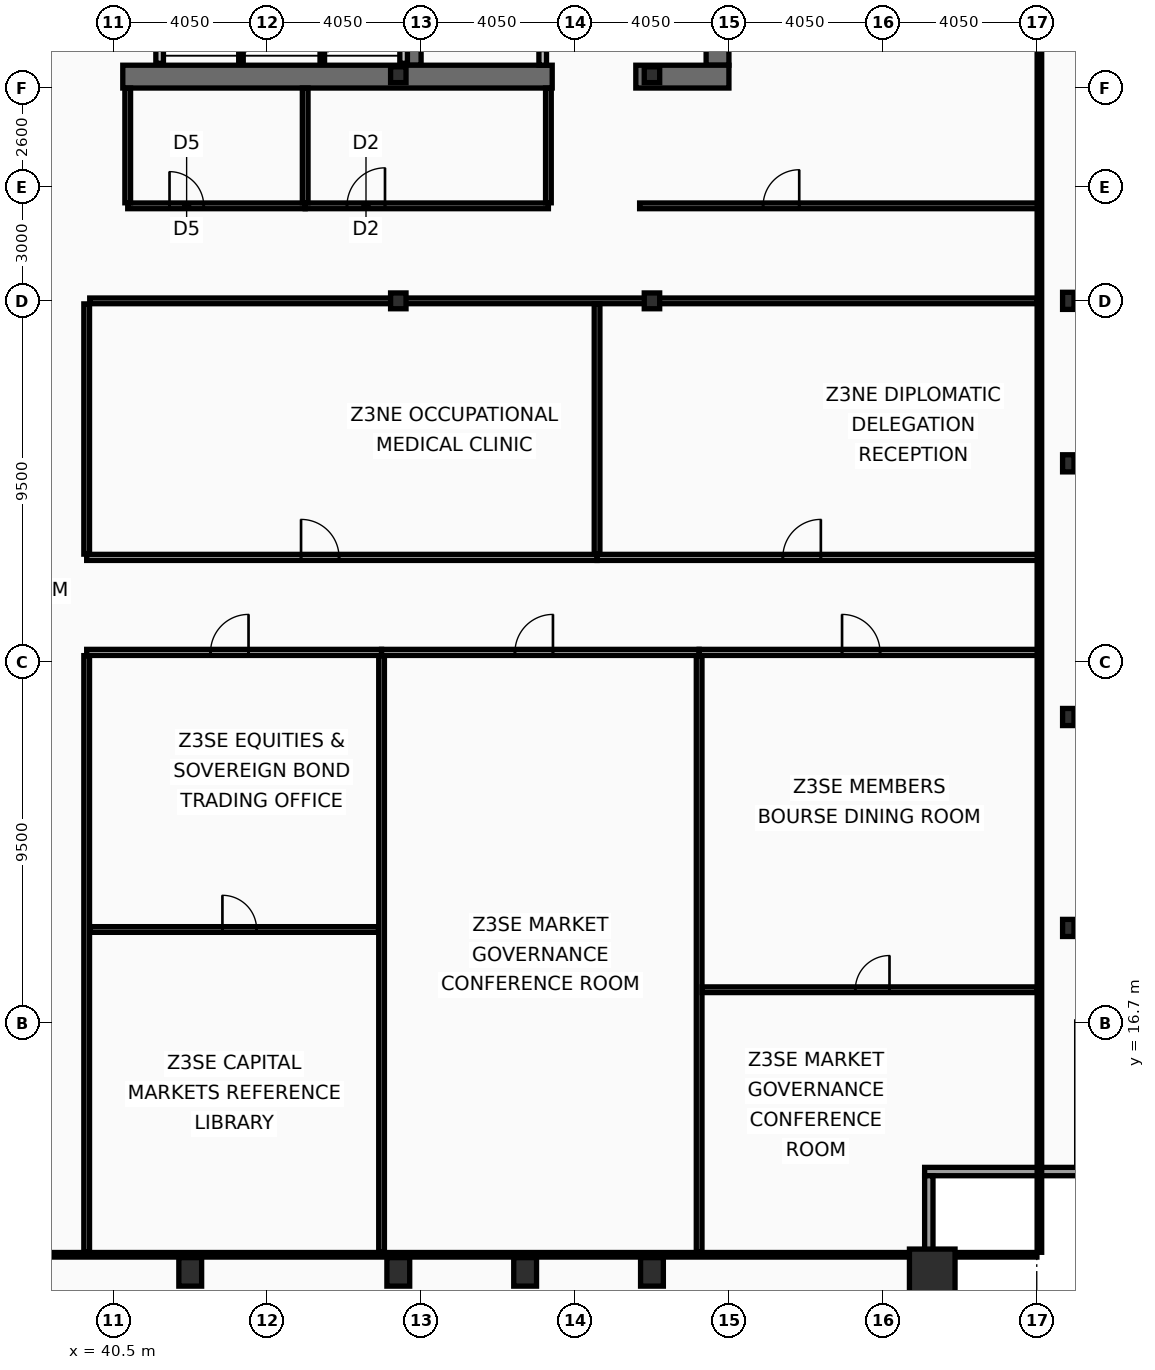
"""IFC4 building model, lengths in metres.
Left out: names, types, materials, properties, quantities, classifications, styles, units other than length and angle.
Written with IfcOpenShell. Run it as: python <this file> out.ifc"""

import sys

from ifc_helpers import new_model, si_unit, direction, frame, frame_2d, origin, origin_2d, place, context, subcontext, project, spatial, rectangle, hollow_rectangle, i_section, extrude, element, fill, save


model = new_model("IFC4")
c1 = context("Model", 3, precision=1e-05, world=origin(), true_north=direction((0.0, 1.0)))
c2 = subcontext(c1, "Body", "Model", "MODEL_VIEW")
j1 = project(units=[si_unit("LENGTHUNIT", "METRE"), si_unit("PLANEANGLEUNIT", "RADIAN")], contexts=[c1])
p1 = place(None, origin())
s1 = spatial("IfcSite", under=j1, at=p1, CompositionType="ELEMENT")
p2 = place(p1, origin())
s2 = spatial("IfcBuilding", under=s1, at=p2, CompositionType="ELEMENT")
p3 = place(p2, frame((0.0, 0.0, 203.0)))
s3 = spatial("IfcBuildingStorey", under=s2, at=p3, CompositionType="ELEMENT", Elevation=203.0)
p4 = place(p3, frame((56.4, 53.1, 0.0), z_axis=(0.0, 0.0, 1.0), x_axis=(0.0, -1.0, 0.0)))
e1 = element("IfcWall", 1, at=p4, inside=s3, PredefinedType="SHEAR", context=c2, shape_type="SweptSolid", body=[
    extrude(rectangle(XDim=11.2, YDim=0.6, at=frame_2d((5.6, 0.0))), origin(), (0.0, 0.0, 1.0), 3.44),
])
p5 = place(p3, frame((48.4, 41.9, 0.0), z_axis=(0.0, 0.0, 1.0), x_axis=(0.0, 1.0, 0.0)))
e2 = element("IfcWall", 2, at=p5, inside=s3, PredefinedType="SHEAR", context=c2, shape_type="SweptSolid", body=[
    extrude(rectangle(XDim=11.2, YDim=0.4, at=frame_2d((5.6, 0.0))), origin(), (0.0, 0.0, 1.0), 3.44),
])
p6 = place(p3, frame((52.05, 41.6, 0.0), z_axis=(0.0, 0.0, 1.0), x_axis=(-1.0, 0.0, 0.0)))
e3 = element("IfcWall", 3, at=p6, inside=s3, PredefinedType="SHEAR", context=c2, shape_type="SweptSolid", body=[
    extrude(rectangle(XDim=11.3, YDim=0.6, at=frame_2d((5.65, 0.0))), origin(), (0.0, 0.0, 1.0), 3.44),
])
p7 = place(p3, frame((56.7, 41.6, 0.0), z_axis=(0.0, 0.0, 1.0), x_axis=(-1.0, 0.0, 0.0)))
e4 = element("IfcWall", 4, at=p7, inside=s3, PredefinedType="SHEAR", context=c2, shape_type="SweptSolid", body=[
    extrude(rectangle(XDim=2.45, YDim=0.6, at=frame_2d((1.225, 0.0))), origin(), (0.0, 0.0, 1.0), 3.44),
])
p8 = place(p3, frame((62.05, 10.15, 0.0), z_axis=(0.0, 0.0, 1.0), x_axis=(1.0, 0.0, 0.0)))
e5 = element("IfcColumn", 5, at=p8, inside=s3, PredefinedType="COLUMN", context=c2, shape_type="SweptSolid", body=[
    extrude(hollow_rectangle(XDim=1.2, YDim=1.2, WallThickness=0.06, at=origin_2d()), origin(), (0.0, 0.0, 1.0), 3.6),
])
for number, where, z_axis, x_axis in (
    (6, (42.525, 10.15, 0.0), (0.0, 0.0, 1.0), (1.0, 0.0, 0.0)),
    (7, (48.0, 10.15, 0.0), (0.0, 0.0, 1.0), (1.0, 0.0, 0.0)),
    (8, (51.337, 10.15, 0.0), (0.0, 0.0, 1.0), (1.0, 0.0, 0.0)),
    (9, (54.675, 10.15, 0.0), (0.0, 0.0, 1.0), (1.0, 0.0, 0.0)),
):
    element("IfcColumn", number, at=place(p3, frame(where, z_axis=z_axis, x_axis=x_axis)), inside=s3, PredefinedType="COLUMN", context=c2, shape_type="SweptSolid", body=[
        extrude(hollow_rectangle(XDim=0.6, YDim=0.75, WallThickness=0.045, at=origin_2d()), origin(), (0.0, 0.0, 1.0), 3.6),
    ])
for number, where, z_axis, x_axis in (
    (10, (65.63, 19.2, 0.0), (0.0, 0.0, 1.0), (1.0, 0.0, 0.0)),
    (11, (65.63, 24.75, 0.0), (0.0, 0.0, 1.0), (1.0, 0.0, 0.0)),
    (12, (65.63, 31.425, 0.0), (0.0, 0.0, 1.0), (1.0, 0.0, 0.0)),
    (13, (65.63, 35.7, 0.0), (0.0, 0.0, 1.0), (1.0, 0.0, 0.0)),
):
    element("IfcColumn", number, at=place(p3, frame(where, z_axis=z_axis, x_axis=x_axis)), inside=s3, PredefinedType="COLUMN", context=c2, shape_type="SweptSolid", body=[
        extrude(i_section(OverallWidth=0.3, OverallDepth=0.45, WebThickness=0.014, FlangeThickness=0.026, at=origin_2d()), origin(), (0.0, 0.0, 1.0), 3.6),
    ])
for number, where, z_axis, x_axis in (
    (14, (48.0, 35.7, 0.0), (0.0, 0.0, 1.0), (1.0, 0.0, 0.0)),
    (15, (48.0, 41.65, 0.0), (0.0, 0.0, 1.0), (1.0, 0.0, 0.0)),
    (16, (54.675, 35.7, 0.0), (0.0, 0.0, 1.0), (1.0, 0.0, 0.0)),
    (17, (54.675, 41.65, 0.0), (0.0, 0.0, 1.0), (1.0, 0.0, 0.0)),
):
    element("IfcColumn", number, at=place(p3, frame(where, z_axis=z_axis, x_axis=x_axis)), inside=s3, PredefinedType="COLUMN", context=c2, shape_type="SweptSolid", body=[
        extrude(i_section(OverallWidth=0.406, OverallDepth=0.416, WebThickness=0.03, FlangeThickness=0.048, at=origin_2d()), origin(), (0.0, 0.0, 1.0), 3.6),
    ])
p9 = place(p3, frame((66.07, 12.79, 0.0), z_axis=(0.0, 0.0, 1.0), x_axis=(-1.0, 0.0, 0.0)))
e18 = element("IfcWall", 18, at=p9, inside=s3, PredefinedType="SOLIDWALL", context=c2, shape_type="SweptSolid", body=[
    extrude(rectangle(XDim=4.22, YDim=0.22, at=frame_2d((2.11, 0.0))), origin(), (0.0, 0.0, 1.0), 2.83),
])
p10 = place(p3, frame((61.96, 12.68, 0.0), z_axis=(0.0, 0.0, 1.0), x_axis=(0.0, -1.0, 0.0)))
e19 = element("IfcWall", 19, at=p10, inside=s3, PredefinedType="SOLIDWALL", context=c2, shape_type="SweptSolid", body=[
    extrude(rectangle(XDim=3.91, YDim=0.22, at=frame_2d((1.955, 0.0))), origin(), (0.0, 0.0, 1.0), 2.83),
])
p11 = place(p3, frame((51.8, 41.9, 0.0), z_axis=(0.0, 0.0, 1.0), x_axis=(0.0, 1.0, 0.0)))
e20 = element("IfcWall", 20, at=p11, inside=s3, PredefinedType="PARTITIONING", context=c2, shape_type="SweptSolid", body=[
    extrude(rectangle(XDim=2.595, YDim=0.2, at=frame_2d((1.298, 0.0))), origin(), (0.0, 0.0, 1.0), 3.44),
])
p12 = place(p11, frame((0.38, 0.0, 0.0)))
e21 = element("IfcOpeningElement", 21, at=p12, cuts=e20, PredefinedType="OPENING", context=c2, shape_type="SweptSolid", body=[
    extrude(rectangle(XDim=1.05, YDim=2.15, at=frame_2d((0.525, 1.075))), frame((0.0, 0.11, 0.0), z_axis=(0.0, -1.0, 0.0), x_axis=(1.0, 0.0, 0.0)), (0.0, 0.0, 1.0), 0.22),
])
for number, where, z_axis, x_axis in (
    (22, (41.72, 41.95, 0.0), (0.0, 0.0, 1.0), (0.0, 1.0, 0.0)),
    (23, (48.14, 41.95, 0.0), (0.0, 0.0, 1.0), (0.0, 1.0, 0.0)),
):
    element("IfcWall", number, at=place(p3, frame(where, z_axis=z_axis, x_axis=x_axis)), inside=s3, PredefinedType="PARTITIONING", context=c2, shape_type="SweptSolid", body=[
        extrude(rectangle(XDim=2.295, YDim=0.2, at=frame_2d((1.147, 0.0))), origin(), (0.0, 0.0, 1.0), 3.44),
    ])
for number, where, z_axis, x_axis in (
    (24, (43.86, 41.95, 0.0), (0.0, 0.0, 1.0), (0.0, 1.0, 0.0)),
    (25, (46.0, 41.95, 0.0), (0.0, 0.0, 1.0), (0.0, 1.0, 0.0)),
):
    element("IfcWall", number, at=place(p3, frame(where, z_axis=z_axis, x_axis=x_axis)), inside=s3, PredefinedType="PARTITIONING", context=c2, shape_type="SweptSolid", body=[
        extrude(rectangle(XDim=2.295, YDim=0.12, at=frame_2d((1.147, 0.0))), origin(), (0.0, 0.0, 1.0), 3.44),
    ])
p13 = place(p3, frame((40.88, 38.2, 0.0), z_axis=(0.0, 0.0, 1.0), x_axis=(1.0, 0.0, 0.0)))
e26 = element("IfcWall", 26, at=p13, inside=s3, PredefinedType="PARTITIONING", context=c2, shape_type="SweptSolid", body=[
    extrude(rectangle(XDim=4.67, YDim=0.15, at=frame_2d((2.335, 0.0))), origin(), (0.0, 0.0, 1.0), 2.73),
])
p14 = place(p13, frame((1.1, 0.0, 0.0)))
e27 = element("IfcOpeningElement", 27, at=p14, cuts=e26, PredefinedType="OPENING", context=c2, shape_type="SweptSolid", body=[
    extrude(rectangle(XDim=0.9, YDim=2.05, at=frame_2d((0.45, 1.025))), frame((0.0, 0.085, 0.0), z_axis=(0.0, -1.0, 0.0), x_axis=(1.0, 0.0, 0.0)), (0.0, 0.0, 1.0), 0.17),
])
p15 = place(p3, frame((45.55, 38.2, 0.0), z_axis=(0.0, 0.0, 1.0), x_axis=(1.0, 0.0, 0.0)))
e28 = element("IfcWall", 28, at=p15, inside=s3, PredefinedType="PARTITIONING", context=c2, shape_type="SweptSolid", body=[
    extrude(rectangle(XDim=6.4, YDim=0.15, at=frame_2d((3.2, 0.0))), origin(), (0.0, 0.0, 1.0), 2.73),
])
p16 = place(p15, frame((1.1, 0.0, 0.0)))
e29 = element("IfcOpeningElement", 29, at=p16, cuts=e28, PredefinedType="OPENING", context=c2, shape_type="SweptSolid", body=[
    extrude(rectangle(XDim=1.0, YDim=2.05, at=frame_2d((0.5, 1.025))), frame((0.0, 0.085, 0.0), z_axis=(0.0, -1.0, 0.0), x_axis=(1.0, 0.0, 0.0)), (0.0, 0.0, 1.0), 0.17),
])
for number, where, z_axis, x_axis in (
    (30, (40.88, 38.28, 0.0), (0.0, 0.0, 1.0), (0.0, 1.0, 0.0)),
    (31, (45.55, 38.28, 0.0), (0.0, 0.0, 1.0), (0.0, 1.0, 0.0)),
    (32, (51.95, 38.28, 0.0), (0.0, 0.0, 1.0), (0.0, 1.0, 0.0)),
):
    element("IfcWall", number, at=place(p3, frame(where, z_axis=z_axis, x_axis=x_axis)), inside=s3, PredefinedType="PARTITIONING", context=c2, shape_type="SweptSolid", body=[
        extrude(rectangle(XDim=3.02, YDim=0.15, at=frame_2d((1.51, 0.0))), origin(), (0.0, 0.0, 1.0), 3.44),
    ])
p17 = place(p3, frame((54.35, 38.2, 0.0), z_axis=(0.0, 0.0, 1.0), x_axis=(1.0, 0.0, 0.0)))
e33 = element("IfcWall", 33, at=p17, inside=s3, PredefinedType="PARTITIONING", context=c2, shape_type="SweptSolid", body=[
    extrude(rectangle(XDim=10.52, YDim=0.15, at=frame_2d((5.26, 0.0))), origin(), (0.0, 0.0, 1.0), 2.73),
])
p18 = place(p17, frame((3.25, 0.0, 0.0)))
e34 = element("IfcOpeningElement", 34, at=p18, cuts=e33, PredefinedType="OPENING", context=c2, shape_type="SweptSolid", body=[
    extrude(rectangle(XDim=0.95, YDim=2.05, at=frame_2d((0.475, 1.025))), frame((0.0, 0.085, 0.0), z_axis=(0.0, -1.0, 0.0), x_axis=(1.0, 0.0, 0.0)), (0.0, 0.0, 1.0), 0.17),
])
p19 = place(p3, frame((39.8, 10.665, 0.0), z_axis=(0.0, 0.0, 1.0), x_axis=(0.0, 1.0, 0.0)))
e35 = element("IfcWall", 35, at=p19, inside=s3, PredefinedType="PARTITIONING", context=c2, shape_type="SweptSolid", body=[
    extrude(rectangle(XDim=15.7, YDim=0.15, at=frame_2d((7.85, 0.0))), origin(), (0.0, 0.0, 1.0), 2.98),
])
p20 = place(p3, frame((39.8, 29.035, 0.0), z_axis=(0.0, 0.0, 1.0), x_axis=(0.0, 1.0, 0.0)))
e36 = element("IfcWall", 36, at=p20, inside=s3, PredefinedType="PARTITIONING", context=c2, shape_type="SweptSolid", body=[
    extrude(rectangle(XDim=6.585, YDim=0.15, at=frame_2d((3.292, 0.0))), origin(), (0.0, 0.0, 1.0), 2.98),
])
p21 = place(p3, frame((39.88, 35.7, 0.0), z_axis=(0.0, 0.0, 1.0), x_axis=(1.0, 0.0, 0.0)))
e37 = element("IfcWall", 37, at=p21, inside=s3, PredefinedType="PARTITIONING", context=c2, shape_type="SweptSolid", body=[
    extrude(rectangle(XDim=24.925, YDim=0.15, at=frame_2d((12.462, 0.0))), origin(), (0.0, 0.0, 1.0), 2.73),
])
p22 = place(p3, frame((39.8, 26.45, 0.0), z_axis=(0.0, 0.0, 1.0), x_axis=(1.0, 0.0, 0.0)))
e38 = element("IfcWall", 38, at=p22, inside=s3, PredefinedType="PARTITIONING", context=c2, shape_type="SweptSolid", body=[
    extrude(rectangle(XDim=7.76, YDim=0.16, at=frame_2d((3.88, 0.0))), origin(), (0.0, 0.0, 1.0), 2.73),
])
p23 = place(p22, frame((3.259, 0.0, 0.0)))
e39 = element("IfcOpeningElement", 39, at=p23, cuts=e38, PredefinedType="OPENING", context=c2, shape_type="SweptSolid", body=[
    extrude(rectangle(XDim=1.0, YDim=2.05, at=frame_2d((0.5, 1.025))), frame((0.0, 0.09, 0.0), z_axis=(0.0, -1.0, 0.0), x_axis=(1.0, 0.0, 0.0)), (0.0, 0.0, 1.0), 0.18),
])
p24 = place(p3, frame((39.88, 19.159, 0.0), z_axis=(0.0, 0.0, 1.0), x_axis=(1.0, 0.0, 0.0)))
e40 = element("IfcWall", 40, at=p24, inside=s3, PredefinedType="PARTITIONING", context=c2, shape_type="SweptSolid", body=[
    extrude(rectangle(XDim=7.6, YDim=0.15, at=frame_2d((3.8, 0.0))), origin(), (0.0, 0.0, 1.0), 2.73),
])
p25 = place(p24, frame((3.492, 0.0, 0.0)))
e41 = element("IfcOpeningElement", 41, at=p25, cuts=e40, PredefinedType="OPENING", context=c2, shape_type="SweptSolid", body=[
    extrude(rectangle(XDim=0.9, YDim=2.05, at=frame_2d((0.45, 1.025))), frame((0.0, 0.085, 0.0), z_axis=(0.0, -1.0, 0.0), x_axis=(1.0, 0.0, 0.0)), (0.0, 0.0, 1.0), 0.17),
])
p26 = place(p3, frame((47.56, 26.45, 0.0), z_axis=(0.0, 0.0, 1.0), x_axis=(1.0, 0.0, 0.0)))
e42 = element("IfcWall", 42, at=p26, inside=s3, PredefinedType="PARTITIONING", context=c2, shape_type="SweptSolid", body=[
    extrude(rectangle(XDim=8.357, YDim=0.16, at=frame_2d((4.178, 0.0))), origin(), (0.0, 0.0, 1.0), 2.73),
])
p27 = place(p26, frame((3.51, 0.0, 0.0)))
e43 = element("IfcOpeningElement", 43, at=p27, cuts=e42, PredefinedType="OPENING", context=c2, shape_type="SweptSolid", body=[
    extrude(rectangle(XDim=1.0, YDim=2.05, at=frame_2d((0.5, 1.025))), frame((0.0, 0.09, 0.0), z_axis=(0.0, -1.0, 0.0), x_axis=(1.0, 0.0, 0.0)), (0.0, 0.0, 1.0), 0.18),
])
p28 = place(p3, frame((47.56, 10.665, 0.0), z_axis=(0.0, 0.0, 1.0), x_axis=(0.0, 1.0, 0.0)))
e44 = element("IfcWall", 44, at=p28, inside=s3, PredefinedType="PARTITIONING", context=c2, shape_type="SweptSolid", body=[
    extrude(rectangle(XDim=15.7, YDim=0.15, at=frame_2d((7.85, 0.0))), origin(), (0.0, 0.0, 1.0), 2.73),
])
p29 = place(p3, frame((55.917, 26.45, 0.0), z_axis=(0.0, 0.0, 1.0), x_axis=(1.0, 0.0, 0.0)))
e45 = element("IfcWall", 45, at=p29, inside=s3, PredefinedType="PARTITIONING", context=c2, shape_type="SweptSolid", body=[
    extrude(rectangle(XDim=8.954, YDim=0.16, at=frame_2d((4.477, 0.0))), origin(), (0.0, 0.0, 1.0), 3.44),
])
p30 = place(p29, frame((3.76, 0.0, 0.0)))
e46 = element("IfcOpeningElement", 46, at=p30, cuts=e45, PredefinedType="OPENING", context=c2, shape_type="SweptSolid", body=[
    extrude(rectangle(XDim=1.0, YDim=2.05, at=frame_2d((0.5, 1.025))), frame((0.0, 0.09, 0.0), z_axis=(0.0, -1.0, 0.0), x_axis=(1.0, 0.0, 0.0)), (0.0, 0.0, 1.0), 0.18),
])
p31 = place(p3, frame((55.917, 10.665, 0.0), z_axis=(0.0, 0.0, 1.0), x_axis=(0.0, 1.0, 0.0)))
e47 = element("IfcWall", 47, at=p31, inside=s3, PredefinedType="PARTITIONING", context=c2, shape_type="SweptSolid", body=[
    extrude(rectangle(XDim=15.7, YDim=0.15, at=frame_2d((7.85, 0.0))), origin(), (0.0, 0.0, 1.0), 2.73),
])
p32 = place(p3, frame((55.996, 17.574, 0.0), z_axis=(0.0, 0.0, 1.0), x_axis=(1.0, 0.0, 0.0)))
e48 = element("IfcWall", 48, at=p32, inside=s3, PredefinedType="PARTITIONING", context=c2, shape_type="SweptSolid", body=[
    extrude(rectangle(XDim=8.809, YDim=0.15, at=frame_2d((4.404, 0.0))), origin(), (0.0, 0.0, 1.0), 2.83),
])
p33 = place(p32, frame((4.029, 0.0, 0.0)))
e49 = element("IfcOpeningElement", 49, at=p33, cuts=e48, PredefinedType="OPENING", context=c2, shape_type="SweptSolid", body=[
    extrude(rectangle(XDim=0.9, YDim=2.05, at=frame_2d((0.45, 1.025))), frame((0.0, 0.085, 0.0), z_axis=(0.0, -1.0, 0.0), x_axis=(1.0, 0.0, 0.0)), (0.0, 0.0, 1.0), 0.17),
])
p34 = place(p3, frame((39.8, 28.95, 0.0), z_axis=(0.0, 0.0, 1.0), x_axis=(1.0, 0.0, 0.0)))
e50 = element("IfcWall", 50, at=p34, inside=s3, PredefinedType="PARTITIONING", context=c2, shape_type="SweptSolid", body=[
    extrude(rectangle(XDim=13.43, YDim=0.16, at=frame_2d((6.715, 0.0))), origin(), (0.0, 0.0, 1.0), 2.73),
])
p35 = place(p34, frame((5.641, 0.0, 0.0)))
e51 = element("IfcOpeningElement", 51, at=p35, cuts=e50, PredefinedType="OPENING", context=c2, shape_type="SweptSolid", body=[
    extrude(rectangle(XDim=1.0, YDim=2.05, at=frame_2d((0.5, 1.025))), frame((0.0, 0.09, 0.0), z_axis=(0.0, -1.0, 0.0), x_axis=(1.0, 0.0, 0.0)), (0.0, 0.0, 1.0), 0.18),
])
p36 = place(p3, frame((53.23, 28.95, 0.0), z_axis=(0.0, 0.0, 1.0), x_axis=(1.0, 0.0, 0.0)))
e52 = element("IfcWall", 52, at=p36, inside=s3, PredefinedType="PARTITIONING", context=c2, shape_type="SweptSolid", body=[
    extrude(rectangle(XDim=11.64, YDim=0.16, at=frame_2d((5.82, 0.0))), origin(), (0.0, 0.0, 1.0), 2.73),
])
p37 = place(p36, frame((4.889, 0.0, 0.0)))
e53 = element("IfcOpeningElement", 53, at=p37, cuts=e52, PredefinedType="OPENING", context=c2, shape_type="SweptSolid", body=[
    extrude(rectangle(XDim=1.0, YDim=2.05, at=frame_2d((0.5, 1.025))), frame((0.0, 0.09, 0.0), z_axis=(0.0, -1.0, 0.0), x_axis=(1.0, 0.0, 0.0)), (0.0, 0.0, 1.0), 0.18),
])
p38 = place(p3, frame((53.23, 29.035, 0.0), z_axis=(0.0, 0.0, 1.0), x_axis=(0.0, 1.0, 0.0)))
e54 = element("IfcWall", 54, at=p38, inside=s3, PredefinedType="PARTITIONING", context=c2, shape_type="SweptSolid", body=[
    extrude(rectangle(XDim=6.585, YDim=0.15, at=frame_2d((3.292, 0.0))), origin(), (0.0, 0.0, 1.0), 2.98),
])
p39 = place(p3, frame((64.87, 10.665, 0.0), z_axis=(0.0, 0.0, 1.0), x_axis=(0.0, 1.0, 0.0)))
e55 = element("IfcWall", 55, at=p39, inside=s3, PredefinedType="PARTITIONING", context=c2, shape_type="SweptSolid", body=[
    extrude(rectangle(XDim=42.11, YDim=0.12, at=frame_2d((21.055, 0.0))), origin(), (0.0, 0.0, 1.0), 2.73),
])
p40 = place(p3, frame((8.095, 10.6, 0.0), z_axis=(0.0, 0.0, 1.0), x_axis=(1.0, 0.0, 0.0)))
e56 = element("IfcWall", 56, at=p40, inside=s3, PredefinedType="PARTITIONING", context=c2, shape_type="SweptSolid", body=[
    extrude(rectangle(XDim=56.71, YDim=0.12, at=frame_2d((28.355, 0.0))), origin(), (0.0, 0.0, 1.0), 2.73),
])
p41 = place(p14, origin())
e57 = element("IfcDoor", 57, at=p41, inside=s3, OperationType="SINGLE_SWING_LEFT", PredefinedType="DOOR", context=c2, shape_type="SweptSolid", body=[
    extrude(rectangle(XDim=0.9, YDim=2.05, at=frame_2d((0.45, 1.025))), frame((0.0, 0.025, 0.0), z_axis=(0.0, -1.0, 0.0), x_axis=(1.0, 0.0, 0.0)), (0.0, 0.0, 1.0), 0.05),
])
fill(e27, e57)
p42 = place(p16, origin())
e58 = element("IfcDoor", 58, at=p42, inside=s3, OperationType="SINGLE_SWING_RIGHT", PredefinedType="DOOR", context=c2, shape_type="SweptSolid", body=[
    extrude(rectangle(XDim=1.0, YDim=2.05, at=frame_2d((0.5, 1.025))), frame((0.0, 0.025, 0.0), z_axis=(0.0, -1.0, 0.0), x_axis=(1.0, 0.0, 0.0)), (0.0, 0.0, 1.0), 0.05),
])
fill(e29, e58)
p43 = place(p18, origin())
e59 = element("IfcDoor", 59, at=p43, inside=s3, OperationType="SINGLE_SWING_RIGHT", PredefinedType="DOOR", context=c2, shape_type="SweptSolid", body=[
    extrude(rectangle(XDim=0.95, YDim=2.05, at=frame_2d((0.475, 1.025))), frame((0.0, 0.025, 0.0), z_axis=(0.0, -1.0, 0.0), x_axis=(1.0, 0.0, 0.0)), (0.0, 0.0, 1.0), 0.05),
])
fill(e34, e59)
p44 = place(p23, origin())
e60 = element("IfcDoor", 60, at=p44, inside=s3, OperationType="SINGLE_SWING_RIGHT", PredefinedType="DOOR", context=c2, shape_type="SweptSolid", body=[
    extrude(rectangle(XDim=1.0, YDim=2.05, at=frame_2d((0.5, 1.025))), frame((0.0, 0.025, 0.0), z_axis=(0.0, -1.0, 0.0), x_axis=(1.0, 0.0, 0.0)), (0.0, 0.0, 1.0), 0.05),
])
fill(e39, e60)
p45 = place(p25, origin())
e61 = element("IfcDoor", 61, at=p45, inside=s3, OperationType="SINGLE_SWING_LEFT", PredefinedType="DOOR", context=c2, shape_type="SweptSolid", body=[
    extrude(rectangle(XDim=0.9, YDim=2.05, at=frame_2d((0.45, 1.025))), frame((0.0, 0.025, 0.0), z_axis=(0.0, -1.0, 0.0), x_axis=(1.0, 0.0, 0.0)), (0.0, 0.0, 1.0), 0.05),
])
fill(e41, e61)
p46 = place(p27, origin())
e62 = element("IfcDoor", 62, at=p46, inside=s3, OperationType="SINGLE_SWING_RIGHT", PredefinedType="DOOR", context=c2, shape_type="SweptSolid", body=[
    extrude(rectangle(XDim=1.0, YDim=2.05, at=frame_2d((0.5, 1.025))), frame((0.0, 0.025, 0.0), z_axis=(0.0, -1.0, 0.0), x_axis=(1.0, 0.0, 0.0)), (0.0, 0.0, 1.0), 0.05),
])
fill(e43, e62)
p47 = place(p30, origin())
e63 = element("IfcDoor", 63, at=p47, inside=s3, OperationType="SINGLE_SWING_LEFT", PredefinedType="DOOR", context=c2, shape_type="SweptSolid", body=[
    extrude(rectangle(XDim=1.0, YDim=2.05, at=frame_2d((0.5, 1.025))), frame((0.0, 0.025, 0.0), z_axis=(0.0, -1.0, 0.0), x_axis=(1.0, 0.0, 0.0)), (0.0, 0.0, 1.0), 0.05),
])
fill(e46, e63)
p48 = place(p33, origin())
e64 = element("IfcDoor", 64, at=p48, inside=s3, OperationType="SINGLE_SWING_RIGHT", PredefinedType="DOOR", context=c2, shape_type="SweptSolid", body=[
    extrude(rectangle(XDim=0.9, YDim=2.05, at=frame_2d((0.45, 1.025))), frame((0.0, 0.025, 0.0), z_axis=(0.0, -1.0, 0.0), x_axis=(1.0, 0.0, 0.0)), (0.0, 0.0, 1.0), 0.05),
])
fill(e49, e64)
p49 = place(p35, origin())
e65 = element("IfcDoor", 65, at=p49, inside=s3, OperationType="SINGLE_SWING_LEFT", PredefinedType="DOOR", context=c2, shape_type="SweptSolid", body=[
    extrude(rectangle(XDim=1.0, YDim=2.05, at=frame_2d((0.5, 1.025))), frame((0.0, 0.025, 0.0), z_axis=(0.0, -1.0, 0.0), x_axis=(1.0, 0.0, 0.0)), (0.0, 0.0, 1.0), 0.05),
])
fill(e51, e65)
p50 = place(p37, origin())
e66 = element("IfcDoor", 66, at=p50, inside=s3, OperationType="SINGLE_SWING_RIGHT", PredefinedType="DOOR", context=c2, shape_type="SweptSolid", body=[
    extrude(rectangle(XDim=1.0, YDim=2.05, at=frame_2d((0.5, 1.025))), frame((0.0, 0.025, 0.0), z_axis=(0.0, -1.0, 0.0), x_axis=(1.0, 0.0, 0.0)), (0.0, 0.0, 1.0), 0.05),
])
fill(e53, e66)
save(model, sys.argv[1])
